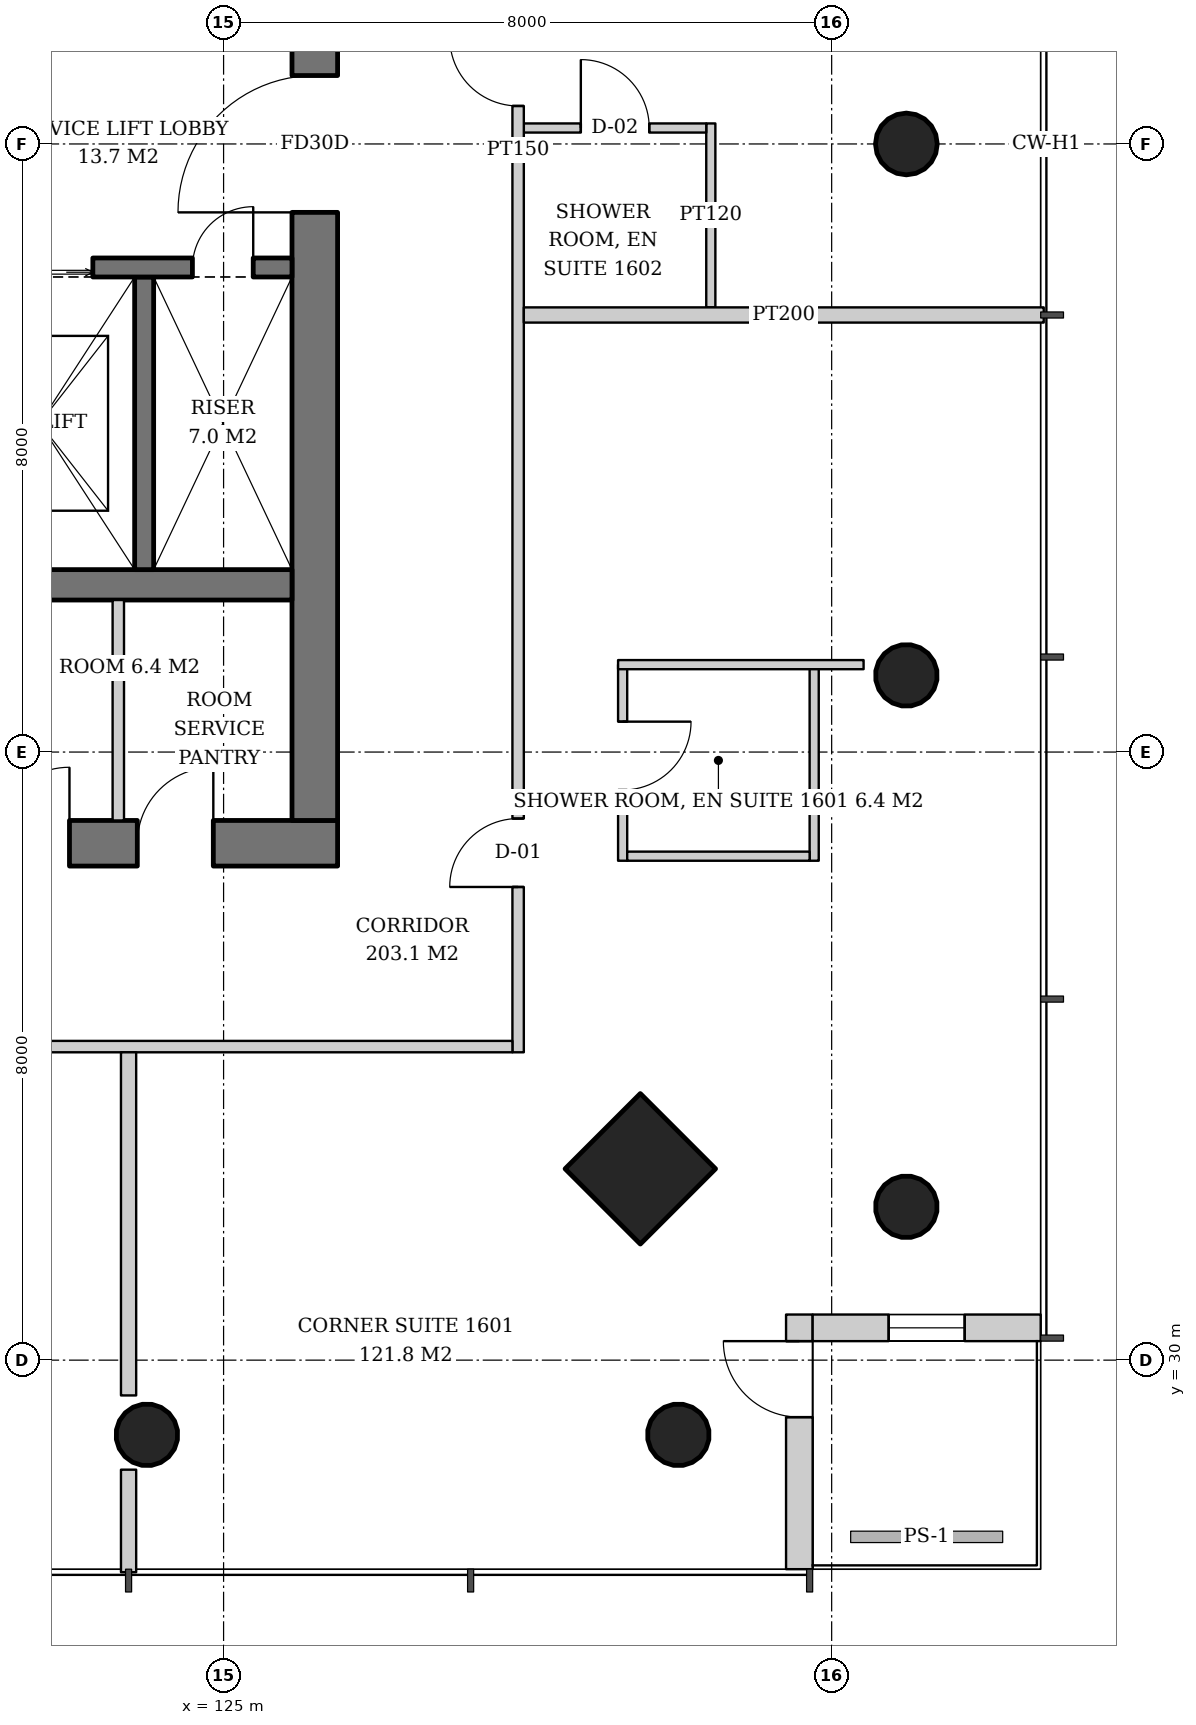
"""IFC4 building model, lengths in metres.
Left out: names, types, materials, properties, quantities, classifications, styles, units other than length and angle.
Written with IfcOpenShell. Run it as: python <this file> out.ifc"""

import sys

from ifc_helpers import new_model, si_unit, direction, frame, frame_2d, origin, origin_2d, place, context, subcontext, project, spatial, rectangle, hollow_circle, extrude, element, fill, save


model = new_model("IFC4")
c1 = context("Model", 3, precision=1e-05, world=origin(), true_north=direction((0.0, 1.0)))
c2 = subcontext(c1, "Body", "Model", "MODEL_VIEW")
j1 = project(units=[si_unit("LENGTHUNIT", "METRE"), si_unit("PLANEANGLEUNIT", "RADIAN")], contexts=[c1])
p1 = place(None, origin())
s1 = spatial("IfcSite", under=j1, at=p1, CompositionType="ELEMENT")
p2 = place(p1, origin())
s2 = spatial("IfcBuilding", under=s1, at=p2, CompositionType="ELEMENT")
p3 = place(p2, frame((0.0, 0.0, 66.6)))
s3 = spatial("IfcBuildingStorey", under=s2, at=p3, CompositionType="ELEMENT", Elevation=66.6)
p4 = place(p3, frame((134.034, 31.966, 0.0), z_axis=(-0.043032401563, 0.043032401563, 0.998146494675), x_axis=(-0.707106781187, -0.707106781187, 0.0)))
e1 = element("IfcColumn", 1, at=p4, inside=s3, PredefinedType="COLUMN", context=c2, shape_type="SweptSolid", body=[
    extrude(hollow_circle(Radius=0.406, WallThickness=0.03, at=origin_2d()), origin(), (0.0, 0.0, 1.0), 3.807),
])
p5 = place(p3, frame((134.034, 38.983, 0.0), z_axis=(-0.043062285527, 0.021563230905, 0.998839660125), x_axis=(-0.44774654769, -0.894160516368, 0.0)))
e2 = element("IfcColumn", 2, at=p5, inside=s3, PredefinedType="COLUMN", context=c2, shape_type="SweptSolid", body=[
    extrude(hollow_circle(Radius=0.406, WallThickness=0.03, at=origin_2d()), origin(), (0.0, 0.0, 1.0), 3.804),
])
p6 = place(p3, frame((134.034, 46.0, 0.0), z_axis=(-0.043072300418, 0.0, 0.999071957837), x_axis=(0.0, -1.0, 0.0)))
e3 = element("IfcColumn", 3, at=p6, inside=s3, PredefinedType="COLUMN", context=c2, shape_type="SweptSolid", body=[
    extrude(hollow_circle(Radius=0.406, WallThickness=0.03, at=origin_2d()), origin(), (0.0, 0.0, 1.0), 3.803),
])
p7 = place(p3, frame((130.534, 32.466, 0.0), z_axis=(-0.043032401563, 0.043032401563, 0.998146494675), x_axis=(-0.707106781187, -0.707106781187, 0.0)))
e4 = element("IfcColumn", 4, at=p7, inside=s3, PredefinedType="COLUMN", context=c2, shape_type="SweptSolid", body=[
    extrude(rectangle(XDim=1.4, YDim=1.4, at=origin_2d()), origin(), (0.0, 0.0, 1.0), 3.807),
])
p8 = place(p3, frame((131.034, 28.966, 0.0), z_axis=(-0.043032401563, 0.043032401563, 0.998146494675), x_axis=(-0.707106781187, -0.707106781187, 0.0)))
e5 = element("IfcColumn", 5, at=p8, inside=s3, PredefinedType="COLUMN", context=c2, shape_type="SweptSolid", body=[
    extrude(hollow_circle(Radius=0.406, WallThickness=0.03, at=origin_2d()), origin(), (0.0, 0.0, 1.0), 3.807),
])
p9 = place(p3, frame((124.017, 28.966, 0.0), z_axis=(-0.021563230905, 0.043062285527, 0.998839660125), x_axis=(-0.894160516368, -0.44774654769, 0.0)))
e6 = element("IfcColumn", 6, at=p9, inside=s3, PredefinedType="COLUMN", context=c2, shape_type="SweptSolid", body=[
    extrude(hollow_circle(Radius=0.406, WallThickness=0.03, at=origin_2d()), origin(), (0.0, 0.0, 1.0), 3.804),
])
p10 = place(p3, frame((107.5, 36.8, 0.0), z_axis=(0.0, 0.0, 1.0), x_axis=(1.0, 0.0, 0.0)))
e7 = element("IfcWall", 7, at=p10, inside=s3, PredefinedType="SHEAR", context=c2, shape_type="SweptSolid", body=[
    extrude(rectangle(XDim=19.0, YDim=0.6, at=frame_2d((9.5, 0.0))), origin(), (0.0, 0.0, 1.0), 3.8),
])
p11 = place(p10, frame((3.9, 0.0, 0.0)))
e8 = element("IfcOpeningElement", 8, at=p11, cuts=e7, PredefinedType="OPENING", context=c2, shape_type="SweptSolid", body=[
    extrude(rectangle(XDim=1.0, YDim=2.1, at=frame_2d((0.5, 1.05))), frame((0.0, 0.31, 0.0), z_axis=(0.0, -1.0, 0.0), x_axis=(1.0, 0.0, 0.0)), (0.0, 0.0, 1.0), 0.62),
])
p12 = place(p10, frame((14.472, 0.0, 0.0)))
e9 = element("IfcOpeningElement", 9, at=p12, cuts=e7, PredefinedType="OPENING", context=c2, shape_type="SweptSolid", body=[
    extrude(rectangle(XDim=1.0, YDim=2.1, at=frame_2d((0.5, 1.05))), frame((0.0, 0.31, 0.0), z_axis=(0.0, -1.0, 0.0), x_axis=(1.0, 0.0, 0.0)), (0.0, 0.0, 1.0), 0.62),
])
p13 = place(p10, frame((16.365, 0.0, 0.0)))
e10 = element("IfcOpeningElement", 10, at=p13, cuts=e7, PredefinedType="OPENING", context=c2, shape_type="SweptSolid", body=[
    extrude(rectangle(XDim=1.0, YDim=2.1, at=frame_2d((0.5, 1.05))), frame((0.0, 0.31, 0.0), z_axis=(0.0, -1.0, 0.0), x_axis=(1.0, 0.0, 0.0)), (0.0, 0.0, 1.0), 0.62),
])
p14 = place(p3, frame((126.2, 37.1, 0.0), z_axis=(0.0, 0.0, 1.0), x_axis=(0.0, 1.0, 0.0)))
e11 = element("IfcWall", 11, at=p14, inside=s3, PredefinedType="SHEAR", context=c2, shape_type="SweptSolid", body=[
    extrude(rectangle(XDim=17.8, YDim=0.6, at=frame_2d((8.9, 0.0))), origin(), (0.0, 0.0, 1.0), 3.8),
])
p15 = place(p14, frame((8.0, 0.0, 0.0)))
e12 = element("IfcOpeningElement", 12, at=p15, cuts=e11, PredefinedType="OPENING", context=c2, shape_type="SweptSolid", body=[
    extrude(rectangle(XDim=1.8, YDim=2.4, at=frame_2d((0.9, 1.2))), frame((0.0, 0.31, 0.0), z_axis=(0.0, -1.0, 0.0), x_axis=(1.0, 0.0, 0.0)), (0.0, 0.0, 1.0), 0.62),
])
p16 = place(p3, frame((108.1, 40.2, 0.0), z_axis=(0.0, 0.0, 1.0), x_axis=(1.0, 0.0, 0.0)))
e13 = element("IfcWall", 13, at=p16, inside=s3, PredefinedType="SHEAR", context=c2, shape_type="SweptSolid", body=[
    extrude(rectangle(XDim=17.8, YDim=0.4, at=frame_2d((8.9, 0.0))), origin(), (0.0, 0.0, 1.0), 3.8),
])
p17 = place(p3, frame((132.575, 27.25, 0.0), z_axis=(0.0, 0.0, 1.0), x_axis=(0.0, 1.0, 0.0)))
e14 = element("IfcWall", 14, at=p17, inside=s3, PredefinedType="SOLIDWALL", context=c2, shape_type="SweptSolid", body=[
    extrude(rectangle(XDim=3.35, YDim=0.35, at=frame_2d((1.675, 0.0))), origin(), (0.0, 0.0, 1.0), 3.6),
])
p18 = place(p17, frame((2.0, 0.0, 0.0)))
e15 = element("IfcOpeningElement", 15, at=p18, cuts=e14, PredefinedType="OPENING", context=c2, shape_type="SweptSolid", body=[
    extrude(rectangle(XDim=1.0, YDim=2.4, at=frame_2d((0.5, 1.2))), frame((0.0, 0.185, 0.0), z_axis=(0.0, -1.0, 0.0), x_axis=(1.0, 0.0, 0.0)), (0.0, 0.0, 1.0), 0.37),
])
p19 = place(p3, frame((132.75, 30.425, 0.0), z_axis=(0.0, 0.0, 1.0), x_axis=(1.0, 0.0, 0.0)))
e16 = element("IfcWall", 16, at=p19, inside=s3, PredefinedType="SOLIDWALL", context=c2, shape_type="SweptSolid", body=[
    extrude(rectangle(XDim=3.0, YDim=0.35, at=frame_2d((1.5, 0.0))), origin(), (0.0, 0.0, 1.0), 3.6),
])
p20 = place(p19, frame((1.0, 0.0, 0.9)))
e17 = element("IfcOpeningElement", 17, at=p20, cuts=e16, PredefinedType="OPENING", context=c2, shape_type="SweptSolid", body=[
    extrude(rectangle(XDim=1.0, YDim=2.4, at=frame_2d((0.5, 1.2))), frame((0.0, 0.185, 0.0), z_axis=(0.0, -1.0, 0.0), x_axis=(1.0, 0.0, 0.0)), (0.0, 0.0, 1.0), 0.37),
])
p21 = place(p3, frame((123.955, 44.25, 0.0), z_axis=(0.0, 0.0, 1.0), x_axis=(0.0, -1.0, 0.0)))
e18 = element("IfcWall", 18, at=p21, inside=s3, PredefinedType="SHEAR", context=c2, shape_type="SweptSolid", body=[
    extrude(rectangle(XDim=3.85, YDim=0.25, at=frame_2d((1.925, 0.0))), origin(), (0.0, 0.0, 1.0), 3.8),
])
p22 = place(p3, frame((121.33, 44.375, 0.0), z_axis=(0.0, 0.0, 1.0), x_axis=(1.0, 0.0, 0.0)))
e19 = element("IfcWall", 19, at=p22, inside=s3, PredefinedType="SHEAR", context=c2, shape_type="SweptSolid", body=[
    extrude(rectangle(XDim=4.57, YDim=0.25, at=frame_2d((2.285, 0.0))), origin(), (0.0, 0.0, 1.0), 3.8),
])
p23 = place(p22, frame((0.55, 0.0, 0.0)))
e20 = element("IfcOpeningElement", 20, at=p23, cuts=e19, PredefinedType="OPENING", context=c2, shape_type="SweptSolid", body=[
    extrude(rectangle(XDim=1.4, YDim=2.4, at=frame_2d((0.7, 1.2))), frame((0.0, 0.135, 0.0), z_axis=(0.0, -1.0, 0.0), x_axis=(1.0, 0.0, 0.0)), (0.0, 0.0, 1.0), 0.27),
])
p24 = place(p22, frame((3.26, 0.0, 0.0)))
e21 = element("IfcOpeningElement", 21, at=p24, cuts=e19, PredefinedType="OPENING", context=c2, shape_type="SweptSolid", body=[
    extrude(rectangle(XDim=0.8, YDim=2.0, at=frame_2d((0.4, 1.0))), frame((0.0, 0.135, 0.0), z_axis=(0.0, -1.0, 0.0), x_axis=(1.0, 0.0, 0.0)), (0.0, 0.0, 1.0), 0.27),
])
p25 = place(p3, frame((123.615, 37.1, 0.0), z_axis=(0.0, 0.0, 1.0), x_axis=(0.0, 1.0, 0.0)))
e22 = element("IfcWall", 22, at=p25, inside=s3, PredefinedType="SOLIDWALL", context=c2, shape_type="SweptSolid", body=[
    extrude(rectangle(XDim=2.9, YDim=0.15, at=frame_2d((1.45, 0.0))), origin(), (0.0, 0.0, 1.0), 3.6),
])
p26 = place(p3, frame((130.25, 39.15, 0.0), z_axis=(0.0, 0.0, 1.0), x_axis=(0.0, -1.0, 0.0)))
e23 = element("IfcWall", 23, at=p26, inside=s3, PredefinedType="PARTITIONING", context=c2, shape_type="SweptSolid", body=[
    extrude(rectangle(XDim=2.58, YDim=0.12, at=frame_2d((1.29, 0.0))), origin(), (0.0, 0.0, 1.0), 2.8),
])
p27 = place(p26, frame((0.75, 0.0, 0.0)))
e24 = element("IfcOpeningElement", 24, at=p27, cuts=e23, PredefinedType="OPENING", context=c2, shape_type="SweptSolid", body=[
    extrude(rectangle(XDim=0.9, YDim=2.1, at=frame_2d((0.45, 1.05))), frame((0.0, 0.07, 0.0), z_axis=(0.0, -1.0, 0.0), x_axis=(1.0, 0.0, 0.0)), (0.0, 0.0, 1.0), 0.14),
])
p28 = place(p3, frame((132.77, 39.15, 0.0), z_axis=(0.0, 0.0, 1.0), x_axis=(0.0, -1.0, 0.0)))
e25 = element("IfcWall", 25, at=p28, inside=s3, PredefinedType="PARTITIONING", context=c2, shape_type="SweptSolid", body=[
    extrude(rectangle(XDim=2.58, YDim=0.12, at=frame_2d((1.29, 0.0))), origin(), (0.0, 0.0, 1.0), 2.8),
])
p29 = place(p3, frame((130.31, 36.63, 0.0), z_axis=(0.0, 0.0, 1.0), x_axis=(1.0, 0.0, 0.0)))
e26 = element("IfcWall", 26, at=p29, inside=s3, PredefinedType="PARTITIONING", context=c2, shape_type="SweptSolid", body=[
    extrude(rectangle(XDim=2.4, YDim=0.12, at=frame_2d((1.2, 0.0))), origin(), (0.0, 0.0, 1.0), 2.8),
])
p30 = place(p3, frame((130.19, 39.15, 0.0), z_axis=(0.0, 0.0, 1.0), x_axis=(1.0, 0.0, 0.0)))
e27 = element("IfcWall", 27, at=p30, inside=s3, PredefinedType="PARTITIONING", context=c2, shape_type="SweptSolid", body=[
    extrude(rectangle(XDim=3.23, YDim=0.12, at=frame_2d((1.615, 0.0))), origin(), (0.0, 0.0, 1.0), 3.6),
])
p31 = place(p3, frame((131.41, 43.85, 0.0), z_axis=(0.0, 0.0, 1.0), x_axis=(0.0, 1.0, 0.0)))
e28 = element("IfcWall", 28, at=p31, inside=s3, PredefinedType="PARTITIONING", context=c2, shape_type="SweptSolid", body=[
    extrude(rectangle(XDim=2.42, YDim=0.12, at=frame_2d((1.21, 0.0))), origin(), (0.0, 0.0, 1.0), 2.847),
])
p32 = place(p3, frame((128.95, 46.21, 0.0), z_axis=(0.0, 0.0, 1.0), x_axis=(1.0, 0.0, 0.0)))
e29 = element("IfcWall", 29, at=p32, inside=s3, PredefinedType="PARTITIONING", context=c2, shape_type="SweptSolid", body=[
    extrude(rectangle(XDim=2.4, YDim=0.12, at=frame_2d((1.2, 0.0))), origin(), (0.0, 0.0, 1.0), 3.6),
])
p33 = place(p32, frame((0.75, 0.0, 0.0)))
e30 = element("IfcOpeningElement", 30, at=p33, cuts=e29, PredefinedType="OPENING", context=c2, shape_type="SweptSolid", body=[
    extrude(rectangle(XDim=0.9, YDim=2.1, at=frame_2d((0.45, 1.05))), frame((0.0, 0.07, 0.0), z_axis=(0.0, -1.0, 0.0), x_axis=(1.0, 0.0, 0.0)), (0.0, 0.0, 1.0), 0.14),
])
p34 = place(p3, frame((128.875, 34.05, 0.0), z_axis=(0.0, 0.0, 1.0), x_axis=(0.0, 1.0, 0.0)))
e31 = element("IfcWall", 31, at=p34, inside=s3, PredefinedType="PARTITIONING", context=c2, shape_type="SweptSolid", body=[
    extrude(rectangle(XDim=23.75, YDim=0.15, at=frame_2d((11.875, 0.0))), origin(), (0.0, 0.0, 1.0), 2.8),
])
p35 = place(p34, frame((2.175, 0.0, 0.0)))
e32 = element("IfcOpeningElement", 32, at=p35, cuts=e31, PredefinedType="OPENING", context=c2, shape_type="SweptSolid", body=[
    extrude(rectangle(XDim=0.9, YDim=2.1, at=frame_2d((0.45, 1.05))), frame((0.0, 0.085, 0.0), z_axis=(0.0, -1.0, 0.0), x_axis=(1.0, 0.0, 0.0)), (0.0, 0.0, 1.0), 0.17),
])
p36 = place(p34, frame((12.45, 0.0, 0.0)))
e33 = element("IfcOpeningElement", 33, at=p36, cuts=e31, PredefinedType="OPENING", context=c2, shape_type="SweptSolid", body=[
    extrude(rectangle(XDim=0.9, YDim=2.1, at=frame_2d((0.45, 1.05))), frame((0.0, 0.085, 0.0), z_axis=(0.0, -1.0, 0.0), x_axis=(1.0, 0.0, 0.0)), (0.0, 0.0, 1.0), 0.17),
])
p37 = place(p3, frame((128.95, 43.75, 0.0), z_axis=(0.0, 0.0, 1.0), x_axis=(1.0, 0.0, 0.0)))
e34 = element("IfcWall", 34, at=p37, inside=s3, PredefinedType="PARTITIONING", context=c2, shape_type="SweptSolid", body=[
    extrude(rectangle(XDim=6.84, YDim=0.2, at=frame_2d((3.42, 0.0))), origin(), (0.0, 0.0, 1.0), 3.05),
])
p38 = place(p3, frame((105.05, 34.125, 0.0), z_axis=(0.0, 0.0, 1.0), x_axis=(1.0, 0.0, 0.0)))
e35 = element("IfcWall", 35, at=p38, inside=s3, PredefinedType="PARTITIONING", context=c2, shape_type="SweptSolid", body=[
    extrude(rectangle(XDim=23.75, YDim=0.15, at=frame_2d((11.875, 0.0))), origin(), (0.0, 0.0, 1.0), 2.8),
])
p39 = place(p38, frame((2.175, 0.0, 0.0)))
e36 = element("IfcOpeningElement", 36, at=p39, cuts=e35, PredefinedType="OPENING", context=c2, shape_type="SweptSolid", body=[
    extrude(rectangle(XDim=0.9, YDim=2.1, at=frame_2d((0.45, 1.05))), frame((0.0, 0.085, 0.0), z_axis=(0.0, -1.0, 0.0), x_axis=(1.0, 0.0, 0.0)), (0.0, 0.0, 1.0), 0.17),
])
p40 = place(p38, frame((12.45, 0.0, 0.0)))
e37 = element("IfcOpeningElement", 37, at=p40, cuts=e35, PredefinedType="OPENING", context=c2, shape_type="SweptSolid", body=[
    extrude(rectangle(XDim=0.9, YDim=2.1, at=frame_2d((0.45, 1.05))), frame((0.0, 0.085, 0.0), z_axis=(0.0, -1.0, 0.0), x_axis=(1.0, 0.0, 0.0)), (0.0, 0.0, 1.0), 0.17),
])
p41 = place(p3, frame((123.75, 34.05, 0.0), z_axis=(0.0, 0.0, 1.0), x_axis=(0.0, -1.0, 0.0)))
e38 = element("IfcWall", 38, at=p41, inside=s3, PredefinedType="PARTITIONING", context=c2, shape_type="SweptSolid", body=[
    extrude(rectangle(XDim=4.514, YDim=0.2, at=frame_2d((2.257, 0.0))), origin(), (0.0, 0.0, 1.0), 3.6),
])
p42 = place(p3, frame((123.75, 28.559, 0.0), z_axis=(0.0, 0.0, 1.0), x_axis=(0.0, -1.0, 0.0)))
e39 = element("IfcWall", 39, at=p42, inside=s3, PredefinedType="PARTITIONING", context=c2, shape_type="SweptSolid", body=[
    extrude(rectangle(XDim=1.349, YDim=0.2, at=frame_2d((0.675, 0.0))), origin(), (0.0, 0.0, 1.0), 3.6),
])
p43 = place(p18, origin())
e40 = element("IfcDoor", 40, at=p43, inside=s3, OperationType="SINGLE_SWING_RIGHT", PredefinedType="DOOR", context=c2, shape_type="SweptSolid", body=[
    extrude(rectangle(XDim=1.0, YDim=2.4, at=frame_2d((0.5, 1.2))), frame((0.0, 0.025, 0.0), z_axis=(0.0, -1.0, 0.0), x_axis=(1.0, 0.0, 0.0)), (0.0, 0.0, 1.0), 0.05),
])
fill(e15, e40)
p44 = place(p20, origin())
e41 = element("IfcWindow", 41, at=p44, inside=s3, PartitioningType="SINGLE_PANEL", PredefinedType="WINDOW", context=c2, shape_type="SweptSolid", body=[
    extrude(rectangle(XDim=1.0, YDim=2.4, at=frame_2d((0.5, 1.2))), frame((0.0, 0.03, 0.0), z_axis=(0.0, -1.0, 0.0), x_axis=(1.0, 0.0, 0.0)), (0.0, 0.0, 1.0), 0.06),
])
fill(e17, e41)
p45 = place(p23, origin())
e42 = element("IfcDoor", 42, at=p45, inside=s3, OperationType="DOUBLE_DOOR_SLIDING", PredefinedType="DOOR", context=c2, shape_type="SweptSolid", body=[
    extrude(rectangle(XDim=1.4, YDim=2.4, at=frame_2d((0.7, 1.2))), frame((0.0, 0.025, 0.0), z_axis=(0.0, -1.0, 0.0), x_axis=(1.0, 0.0, 0.0)), (0.0, 0.0, 1.0), 0.05),
])
fill(e20, e42)
p46 = place(p24, origin())
e43 = element("IfcDoor", 43, at=p46, inside=s3, OperationType="SINGLE_SWING_RIGHT", PredefinedType="DOOR", context=c2, shape_type="SweptSolid", body=[
    extrude(rectangle(XDim=0.8, YDim=2.0, at=frame_2d((0.4, 1.0))), frame((0.0, 0.025, 0.0), z_axis=(0.0, -1.0, 0.0), x_axis=(1.0, 0.0, 0.0)), (0.0, 0.0, 1.0), 0.05),
])
fill(e21, e43)
p47 = place(p15, origin())
e44 = element("IfcDoor", 44, at=p47, inside=s3, OperationType="DOUBLE_DOOR_SINGLE_SWING", PredefinedType="DOOR", context=c2, shape_type="SweptSolid", body=[
    extrude(rectangle(XDim=1.8, YDim=2.4, at=frame_2d((0.9, 1.2))), frame((0.0, 0.025, 0.0), z_axis=(0.0, -1.0, 0.0), x_axis=(1.0, 0.0, 0.0)), (0.0, 0.0, 1.0), 0.05),
])
fill(e12, e44)
p48 = place(p12, origin())
e45 = element("IfcDoor", 45, at=p48, inside=s3, OperationType="SINGLE_SWING_RIGHT", PredefinedType="DOOR", context=c2, shape_type="SweptSolid", body=[
    extrude(rectangle(XDim=1.0, YDim=2.1, at=frame_2d((0.5, 1.05))), frame((0.0, 0.29, 0.0), z_axis=(0.0, -1.0, 0.0), x_axis=(1.0, 0.0, 0.0)), (0.0, 0.0, 1.0), 0.05),
])
fill(e9, e45)
p49 = place(p13, origin())
e46 = element("IfcDoor", 46, at=p49, inside=s3, OperationType="SINGLE_SWING_RIGHT", PredefinedType="DOOR", context=c2, shape_type="SweptSolid", body=[
    extrude(rectangle(XDim=1.0, YDim=2.1, at=frame_2d((0.5, 1.05))), frame((0.0, 0.29, 0.0), z_axis=(0.0, -1.0, 0.0), x_axis=(1.0, 0.0, 0.0)), (0.0, 0.0, 1.0), 0.05),
])
fill(e10, e46)
p50 = place(p27, origin())
e47 = element("IfcDoor", 47, at=p50, inside=s3, OperationType="SINGLE_SWING_LEFT", PredefinedType="DOOR", context=c2, shape_type="SweptSolid", body=[
    extrude(rectangle(XDim=0.9, YDim=2.1, at=frame_2d((0.45, 1.05))), frame((0.0, 0.025, 0.0), z_axis=(0.0, -1.0, 0.0), x_axis=(1.0, 0.0, 0.0)), (0.0, 0.0, 1.0), 0.05),
])
fill(e24, e47)
p51 = place(p33, origin())
e48 = element("IfcDoor", 48, at=p51, inside=s3, OperationType="SINGLE_SWING_LEFT", PredefinedType="DOOR", context=c2, shape_type="SweptSolid", body=[
    extrude(rectangle(XDim=0.9, YDim=2.1, at=frame_2d((0.45, 1.05))), frame((0.0, 0.025, 0.0), z_axis=(0.0, -1.0, 0.0), x_axis=(1.0, 0.0, 0.0)), (0.0, 0.0, 1.0), 0.05),
])
fill(e30, e48)
p52 = place(p35, origin())
e49 = element("IfcDoor", 49, at=p52, inside=s3, OperationType="SINGLE_SWING_LEFT", PredefinedType="DOOR", context=c2, shape_type="SweptSolid", body=[
    extrude(rectangle(XDim=0.9, YDim=2.1, at=frame_2d((0.45, 1.05))), frame((0.0, 0.025, 0.0), z_axis=(0.0, -1.0, 0.0), x_axis=(1.0, 0.0, 0.0)), (0.0, 0.0, 1.0), 0.05),
])
fill(e32, e49)
p53 = place(p36, origin())
e50 = element("IfcDoor", 50, at=p53, inside=s3, OperationType="SINGLE_SWING_RIGHT", PredefinedType="DOOR", context=c2, shape_type="SweptSolid", body=[
    extrude(rectangle(XDim=0.9, YDim=2.1, at=frame_2d((0.45, 1.05))), frame((0.0, 0.025, 0.0), z_axis=(0.0, -1.0, 0.0), x_axis=(1.0, 0.0, 0.0)), (0.0, 0.0, 1.0), 0.05),
])
fill(e33, e50)
save(model, sys.argv[1])
